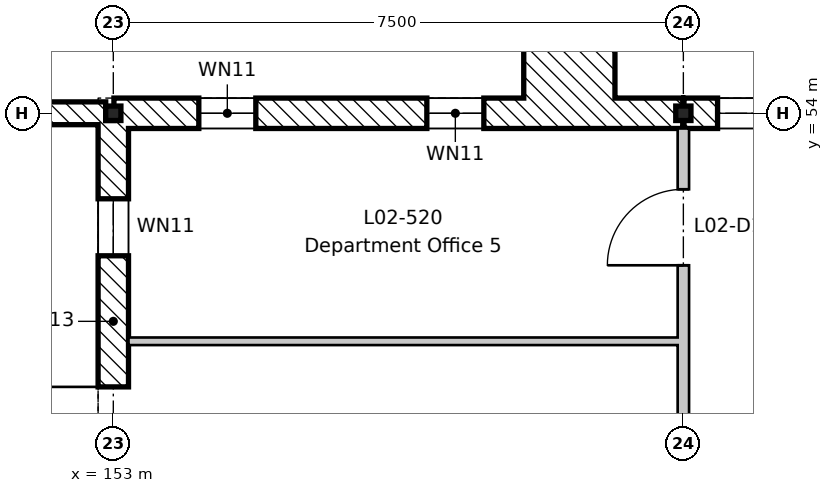
"""IFC4 building model, lengths in metres.
Left out: names, types, materials, properties, quantities, classifications, styles, units other than length and angle.
Written with IfcOpenShell. Run it as: python <this file> out.ifc"""

import sys

from ifc_helpers import new_model, si_unit, direction, frame, frame_2d, origin, origin_2d, place, context, subcontext, project, spatial, rectangle, i_section, extrude, element, fill, save


model = new_model("IFC4")
c1 = context("Model", 3, precision=1e-05, world=origin(), true_north=direction((0.0, 1.0)))
c2 = subcontext(c1, "Body", "Model", "MODEL_VIEW")
j1 = project(units=[si_unit("LENGTHUNIT", "METRE"), si_unit("PLANEANGLEUNIT", "RADIAN")], contexts=[c1])
p1 = place(None, origin())
s1 = spatial("IfcSite", under=j1, at=p1, CompositionType="ELEMENT")
p2 = place(p1, origin())
s2 = spatial("IfcBuilding", under=s1, at=p2, CompositionType="ELEMENT")
p3 = place(p2, frame((0.0, 0.0, 9.9)))
s3 = spatial("IfcBuildingStorey", under=s2, at=p3, CompositionType="ELEMENT", Elevation=9.9)
for number, where, z_axis, x_axis in (
    (1, (153.0, 54.0, -0.2), (0.0, 0.0, 1.0), (1.0, 0.0, 0.0)),
    (2, (160.5, 54.0, -0.2), (0.0, 0.0, 1.0), (1.0, 0.0, 0.0)),
):
    element("IfcColumn", number, at=place(p3, frame(where, z_axis=z_axis, x_axis=x_axis)), inside=s3, PredefinedType="COLUMN", context=c2, shape_type="SweptSolid", body=[
        extrude(i_section(OverallWidth=0.2, OverallDepth=0.19, WebThickness=0.007, FlangeThickness=0.01, FilletRadius=0.018, at=origin_2d()), origin(), (0.0, 0.0, 1.0), 4.45),
    ])
p4 = place(p3, frame((153.0, 45.095, 0.0), z_axis=(0.0, 0.0, 1.0), x_axis=(0.0, 1.0, 0.0)))
e3 = element("IfcWall", 3, at=p4, inside=s3, PredefinedType="STANDARD", context=c2, shape_type="SweptSolid", body=[
    extrude(rectangle(XDim=8.81, YDim=0.4, at=frame_2d((4.405, 0.0))), origin(), (0.0, 0.0, 1.0), 3.85),
])
p5 = place(p4, frame((3.505, 0.0, 0.0)))
e4 = element("IfcOpeningElement", 4, at=p5, cuts=e3, PredefinedType="OPENING", context=c2, shape_type="SweptSolid", body=[
    extrude(rectangle(XDim=1.8, YDim=2.4, at=frame_2d((0.9, 1.2))), frame((0.0, 0.21, 0.0), z_axis=(0.0, -1.0, 0.0), x_axis=(1.0, 0.0, 0.0)), (0.0, 0.0, 1.0), 0.42),
])
p6 = place(p4, frame((1.03, 0.0, 1.5)))
e5 = element("IfcOpeningElement", 5, at=p6, cuts=e3, PredefinedType="OPENING", context=c2, shape_type="SweptSolid", body=[
    extrude(rectangle(XDim=0.75, YDim=1.2, at=frame_2d((0.375, 0.6))), frame((0.0, 0.21, 0.0), z_axis=(0.0, -1.0, 0.0), x_axis=(1.0, 0.0, 0.0)), (0.0, 0.0, 1.0), 0.42),
])
p7 = place(p4, frame((7.03, 0.0, 1.5)))
e6 = element("IfcOpeningElement", 6, at=p7, cuts=e3, PredefinedType="OPENING", context=c2, shape_type="SweptSolid", body=[
    extrude(rectangle(XDim=0.75, YDim=1.2, at=frame_2d((0.375, 0.6))), frame((0.0, 0.21, 0.0), z_axis=(0.0, -1.0, 0.0), x_axis=(1.0, 0.0, 0.0)), (0.0, 0.0, 1.0), 0.42),
])
p8 = place(p3, frame((153.008, 54.0, 0.0), z_axis=(0.0, 0.0, 1.0), x_axis=(1.0, 0.0, 0.0)))
e7 = element("IfcWall", 7, at=p8, inside=s3, PredefinedType="STANDARD", context=c2, shape_type="SweptSolid", body=[
    extrude(rectangle(XDim=7.483, YDim=0.4, at=frame_2d((3.742, 0.0))), origin(), (0.0, 0.0, 1.0), 3.92),
])
p9 = place(p8, frame((1.117, 0.0, 1.5)))
e8 = element("IfcOpeningElement", 8, at=p9, cuts=e7, PredefinedType="OPENING", context=c2, shape_type="SweptSolid", body=[
    extrude(rectangle(XDim=0.75, YDim=1.2, at=frame_2d((0.375, 0.6))), frame((0.0, 0.21, 0.0), z_axis=(0.0, -1.0, 0.0), x_axis=(1.0, 0.0, 0.0)), (0.0, 0.0, 1.0), 0.42),
])
p10 = place(p8, frame((4.117, 0.0, 1.5)))
e9 = element("IfcOpeningElement", 9, at=p10, cuts=e7, PredefinedType="OPENING", context=c2, shape_type="SweptSolid", body=[
    extrude(rectangle(XDim=0.75, YDim=1.2, at=frame_2d((0.375, 0.6))), frame((0.0, 0.21, 0.0), z_axis=(0.0, -1.0, 0.0), x_axis=(1.0, 0.0, 0.0)), (0.0, 0.0, 1.0), 0.42),
])
p11 = place(p3, frame((160.508, 54.0, 0.0), z_axis=(0.0, 0.0, 1.0), x_axis=(1.0, 0.0, 0.0)))
e10 = element("IfcWall", 10, at=p11, inside=s3, PredefinedType="STANDARD", context=c2, shape_type="SweptSolid", body=[
    extrude(rectangle(XDim=2.983, YDim=0.4, at=frame_2d((1.492, 0.0))), origin(), (0.0, 0.0, 1.0), 4.05),
])
p12 = place(p11, frame((0.442, 0.0, 0.9)))
e11 = element("IfcOpeningElement", 11, at=p12, cuts=e10, PredefinedType="OPENING", context=c2, shape_type="SweptSolid", body=[
    extrude(rectangle(XDim=2.1, YDim=2.1, at=frame_2d((1.05, 1.05))), frame((0.0, 0.21, 0.0), z_axis=(0.0, -1.0, 0.0), x_axis=(1.0, 0.0, 0.0)), (0.0, 0.0, 1.0), 0.42),
])
p13 = place(p3, frame((158.4, 54.8, 0.0), z_axis=(0.0, 0.0, 1.0), x_axis=(1.0, 0.0, 0.0)))
e12 = element("IfcWall", 12, at=p13, inside=s3, PredefinedType="STANDARD", context=c2, shape_type="SweptSolid", body=[
    extrude(rectangle(XDim=1.2, YDim=1.2, at=frame_2d((0.6, 0.0))), origin(), (0.0, 0.0, 1.0), 3.65),
])
p14 = place(p3, frame((152.9, 54.0, 0.0), z_axis=(0.0, 0.0, 1.0), x_axis=(-1.0, 0.0, 0.0)))
e13 = element("IfcWall", 13, at=p14, inside=s3, PredefinedType="STANDARD", context=c2, shape_type="SweptSolid", body=[
    extrude(rectangle(XDim=2.3, YDim=0.3, at=frame_2d((1.15, 0.0))), origin(), (0.0, 0.0, 1.0), 3.97),
])
p15 = place(p3, frame((153.2, 51.0, 0.0), z_axis=(0.0, 0.0, 1.0), x_axis=(1.0, 0.0, 0.0)))
e14 = element("IfcWall", 14, at=p15, inside=s3, PredefinedType="PARTITIONING", context=c2, shape_type="SweptSolid", body=[
    extrude(rectangle(XDim=7.225, YDim=0.1, at=frame_2d((3.613, 0.0))), origin(), (0.0, 0.0, 1.0), 4.25),
])
p16 = place(p3, frame((160.5, -8.8, 0.0), z_axis=(0.0, 0.0, 1.0), x_axis=(0.0, 1.0, 0.0)))
e15 = element("IfcWall", 15, at=p16, inside=s3, PredefinedType="PARTITIONING", context=c2, shape_type="SweptSolid", body=[
    extrude(rectangle(XDim=62.6, YDim=0.15, at=frame_2d((31.3, 0.0))), origin(), (0.0, 0.0, 1.0), 3.73),
])
p17 = place(p16, frame((0.8, 0.0, 0.0)))
e16 = element("IfcOpeningElement", 16, at=p17, cuts=e15, PredefinedType="OPENING", context=c2, shape_type="SweptSolid", body=[
    extrude(rectangle(XDim=1.0, YDim=2.1, at=frame_2d((0.5, 1.05))), frame((0.0, 0.085, 0.0), z_axis=(0.0, -1.0, 0.0), x_axis=(1.0, 0.0, 0.0)), (0.0, 0.0, 1.0), 0.17),
])
p18 = place(p16, frame((5.3, 0.0, 0.0)))
e17 = element("IfcOpeningElement", 17, at=p18, cuts=e15, PredefinedType="OPENING", context=c2, shape_type="SweptSolid", body=[
    extrude(rectangle(XDim=1.0, YDim=2.1, at=frame_2d((0.5, 1.05))), frame((0.0, 0.085, 0.0), z_axis=(0.0, -1.0, 0.0), x_axis=(1.0, 0.0, 0.0)), (0.0, 0.0, 1.0), 0.17),
])
p19 = place(p16, frame((9.8, 0.0, 0.0)))
e18 = element("IfcOpeningElement", 18, at=p19, cuts=e15, PredefinedType="OPENING", context=c2, shape_type="SweptSolid", body=[
    extrude(rectangle(XDim=1.0, YDim=2.1, at=frame_2d((0.5, 1.05))), frame((0.0, 0.085, 0.0), z_axis=(0.0, -1.0, 0.0), x_axis=(1.0, 0.0, 0.0)), (0.0, 0.0, 1.0), 0.17),
])
p20 = place(p16, frame((12.8, 0.0, 0.0)))
e19 = element("IfcOpeningElement", 19, at=p20, cuts=e15, PredefinedType="OPENING", context=c2, shape_type="SweptSolid", body=[
    extrude(rectangle(XDim=1.0, YDim=2.1, at=frame_2d((0.5, 1.05))), frame((0.0, 0.085, 0.0), z_axis=(0.0, -1.0, 0.0), x_axis=(1.0, 0.0, 0.0)), (0.0, 0.0, 1.0), 0.17),
])
p21 = place(p16, frame((18.6, 0.0, 0.0)))
e20 = element("IfcOpeningElement", 20, at=p21, cuts=e15, PredefinedType="OPENING", context=c2, shape_type="SweptSolid", body=[
    extrude(rectangle(XDim=1.4, YDim=2.1, at=frame_2d((0.7, 1.05))), frame((0.0, 0.085, 0.0), z_axis=(0.0, -1.0, 0.0), x_axis=(1.0, 0.0, 0.0)), (0.0, 0.0, 1.0), 0.17),
])
p22 = place(p16, frame((27.55, 0.0, 0.0)))
e21 = element("IfcOpeningElement", 21, at=p22, cuts=e15, PredefinedType="OPENING", context=c2, shape_type="SweptSolid", body=[
    extrude(rectangle(XDim=1.0, YDim=2.1, at=frame_2d((0.5, 1.05))), frame((0.0, 0.085, 0.0), z_axis=(0.0, -1.0, 0.0), x_axis=(1.0, 0.0, 0.0)), (0.0, 0.0, 1.0), 0.17),
])
p23 = place(p16, frame((30.8, 0.0, 0.0)))
e22 = element("IfcOpeningElement", 22, at=p23, cuts=e15, PredefinedType="OPENING", context=c2, shape_type="SweptSolid", body=[
    extrude(rectangle(XDim=1.0, YDim=2.1, at=frame_2d((0.5, 1.05))), frame((0.0, 0.085, 0.0), z_axis=(0.0, -1.0, 0.0), x_axis=(1.0, 0.0, 0.0)), (0.0, 0.0, 1.0), 0.17),
])
p24 = place(p16, frame((33.8, 0.0, 0.0)))
e23 = element("IfcOpeningElement", 23, at=p24, cuts=e15, PredefinedType="OPENING", context=c2, shape_type="SweptSolid", body=[
    extrude(rectangle(XDim=1.0, YDim=2.1, at=frame_2d((0.5, 1.05))), frame((0.0, 0.085, 0.0), z_axis=(0.0, -1.0, 0.0), x_axis=(1.0, 0.0, 0.0)), (0.0, 0.0, 1.0), 0.17),
])
p25 = place(p16, frame((38.3, 0.0, 0.0)))
e24 = element("IfcOpeningElement", 24, at=p25, cuts=e15, PredefinedType="OPENING", context=c2, shape_type="SweptSolid", body=[
    extrude(rectangle(XDim=1.0, YDim=2.1, at=frame_2d((0.5, 1.05))), frame((0.0, 0.085, 0.0), z_axis=(0.0, -1.0, 0.0), x_axis=(1.0, 0.0, 0.0)), (0.0, 0.0, 1.0), 0.17),
])
p26 = place(p16, frame((42.8, 0.0, 0.0)))
e25 = element("IfcOpeningElement", 25, at=p26, cuts=e15, PredefinedType="OPENING", context=c2, shape_type="SweptSolid", body=[
    extrude(rectangle(XDim=1.0, YDim=2.1, at=frame_2d((0.5, 1.05))), frame((0.0, 0.085, 0.0), z_axis=(0.0, -1.0, 0.0), x_axis=(1.0, 0.0, 0.0)), (0.0, 0.0, 1.0), 0.17),
])
p27 = place(p16, frame((45.8, 0.0, 0.0)))
e26 = element("IfcOpeningElement", 26, at=p27, cuts=e15, PredefinedType="OPENING", context=c2, shape_type="SweptSolid", body=[
    extrude(rectangle(XDim=1.0, YDim=2.1, at=frame_2d((0.5, 1.05))), frame((0.0, 0.085, 0.0), z_axis=(0.0, -1.0, 0.0), x_axis=(1.0, 0.0, 0.0)), (0.0, 0.0, 1.0), 0.17),
])
p28 = place(p16, frame((50.3, 0.0, 0.0)))
e27 = element("IfcOpeningElement", 27, at=p28, cuts=e15, PredefinedType="OPENING", context=c2, shape_type="SweptSolid", body=[
    extrude(rectangle(XDim=1.0, YDim=2.1, at=frame_2d((0.5, 1.05))), frame((0.0, 0.085, 0.0), z_axis=(0.0, -1.0, 0.0), x_axis=(1.0, 0.0, 0.0)), (0.0, 0.0, 1.0), 0.17),
])
p29 = place(p16, frame((54.8, 0.0, 0.0)))
e28 = element("IfcOpeningElement", 28, at=p29, cuts=e15, PredefinedType="OPENING", context=c2, shape_type="SweptSolid", body=[
    extrude(rectangle(XDim=1.0, YDim=2.1, at=frame_2d((0.5, 1.05))), frame((0.0, 0.085, 0.0), z_axis=(0.0, -1.0, 0.0), x_axis=(1.0, 0.0, 0.0)), (0.0, 0.0, 1.0), 0.17),
])
p30 = place(p16, frame((57.8, 0.0, 0.0)))
e29 = element("IfcOpeningElement", 29, at=p30, cuts=e15, PredefinedType="OPENING", context=c2, shape_type="SweptSolid", body=[
    extrude(rectangle(XDim=1.0, YDim=2.1, at=frame_2d((0.5, 1.05))), frame((0.0, 0.085, 0.0), z_axis=(0.0, -1.0, 0.0), x_axis=(1.0, 0.0, 0.0)), (0.0, 0.0, 1.0), 0.17),
])
p31 = place(p16, frame((60.8, 0.0, 0.0)))
e30 = element("IfcOpeningElement", 30, at=p31, cuts=e15, PredefinedType="OPENING", context=c2, shape_type="SweptSolid", body=[
    extrude(rectangle(XDim=1.0, YDim=2.1, at=frame_2d((0.5, 1.05))), frame((0.0, 0.085, 0.0), z_axis=(0.0, -1.0, 0.0), x_axis=(1.0, 0.0, 0.0)), (0.0, 0.0, 1.0), 0.17),
])
p32 = place(p5, origin())
e31 = element("IfcDoor", 31, at=p32, inside=s3, OperationType="DOUBLE_DOOR_SINGLE_SWING", PredefinedType="DOOR", context=c2, shape_type="SweptSolid", body=[
    extrude(rectangle(XDim=1.8, YDim=2.4, at=frame_2d((0.9, 1.2))), frame((0.0, 0.025, 0.0), z_axis=(0.0, -1.0, 0.0), x_axis=(1.0, 0.0, 0.0)), (0.0, 0.0, 1.0), 0.05),
])
fill(e4, e31)
p33 = place(p7, origin())
e32 = element("IfcWindow", 32, at=p33, inside=s3, PartitioningType="SINGLE_PANEL", PredefinedType="WINDOW", context=c2, shape_type="SweptSolid", body=[
    extrude(rectangle(XDim=0.75, YDim=1.2, at=frame_2d((0.375, 0.6))), frame((0.0, -0.12, 0.0), z_axis=(0.0, -1.0, 0.0), x_axis=(1.0, 0.0, 0.0)), (0.0, 0.0, 1.0), 0.06),
])
fill(e6, e32)
p34 = place(p9, origin())
e33 = element("IfcWindow", 33, at=p34, inside=s3, PartitioningType="SINGLE_PANEL", PredefinedType="WINDOW", context=c2, shape_type="SweptSolid", body=[
    extrude(rectangle(XDim=0.75, YDim=1.2, at=frame_2d((0.375, 0.6))), frame((0.0, -0.12, 0.0), z_axis=(0.0, -1.0, 0.0), x_axis=(1.0, 0.0, 0.0)), (0.0, 0.0, 1.0), 0.06),
])
fill(e8, e33)
p35 = place(p10, origin())
e34 = element("IfcWindow", 34, at=p35, inside=s3, PartitioningType="SINGLE_PANEL", PredefinedType="WINDOW", context=c2, shape_type="SweptSolid", body=[
    extrude(rectangle(XDim=0.75, YDim=1.2, at=frame_2d((0.375, 0.6))), frame((0.0, -0.12, 0.0), z_axis=(0.0, -1.0, 0.0), x_axis=(1.0, 0.0, 0.0)), (0.0, 0.0, 1.0), 0.06),
])
fill(e9, e34)
p36 = place(p12, origin())
e35 = element("IfcWindow", 35, at=p36, inside=s3, PartitioningType="SINGLE_PANEL", PredefinedType="WINDOW", context=c2, shape_type="SweptSolid", body=[
    extrude(rectangle(XDim=2.1, YDim=2.1, at=frame_2d((1.05, 1.05))), frame((0.0, -0.12, 0.0), z_axis=(0.0, -1.0, 0.0), x_axis=(1.0, 0.0, 0.0)), (0.0, 0.0, 1.0), 0.06),
])
fill(e11, e35)
p37 = place(p31, origin())
e36 = element("IfcDoor", 36, at=p37, inside=s3, OperationType="SINGLE_SWING_LEFT", PredefinedType="DOOR", context=c2, shape_type="SweptSolid", body=[
    extrude(rectangle(XDim=1.0, YDim=2.1, at=frame_2d((0.5, 1.05))), frame((0.0, 0.025, 0.0), z_axis=(0.0, -1.0, 0.0), x_axis=(1.0, 0.0, 0.0)), (0.0, 0.0, 1.0), 0.05),
])
fill(e30, e36)
save(model, sys.argv[1])
